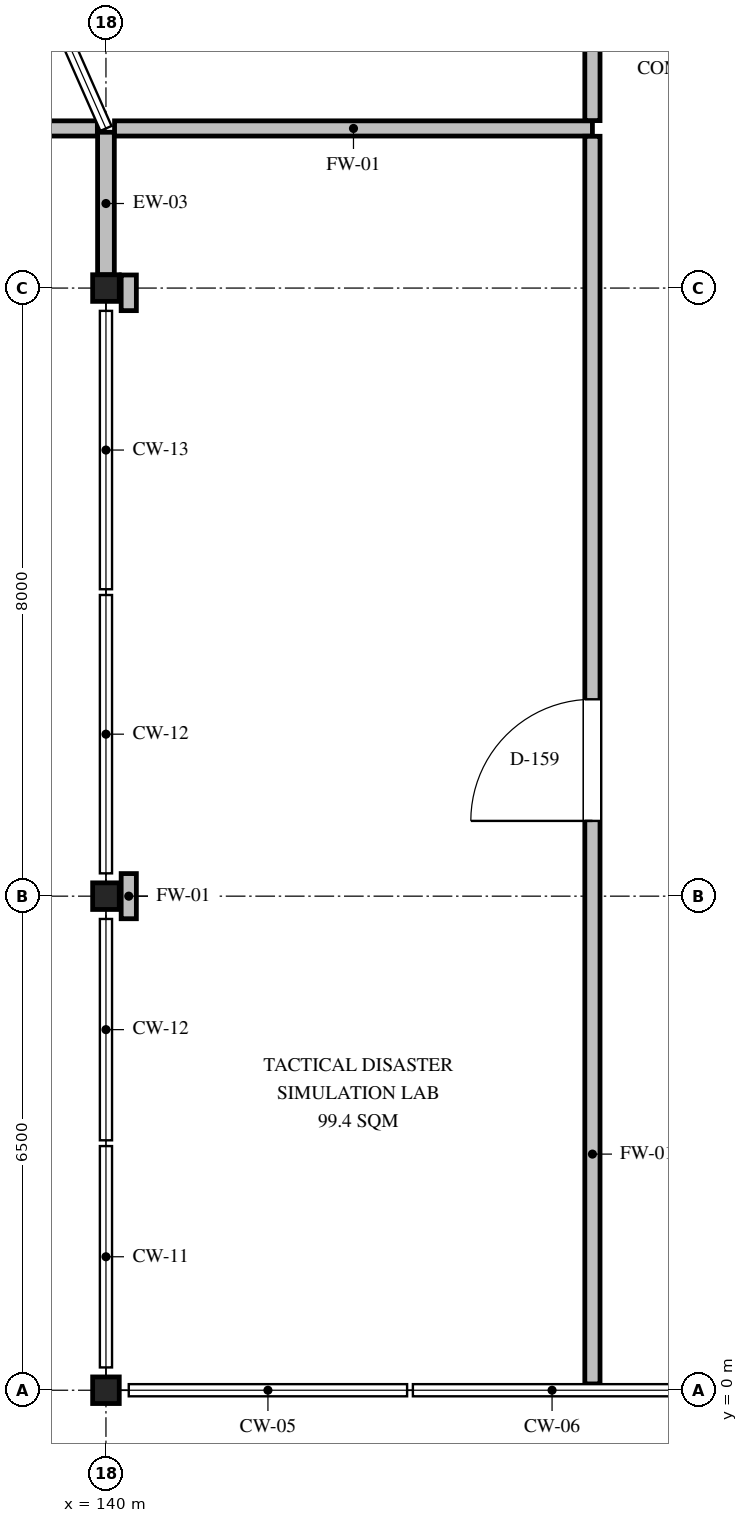
"""IFC4 building model, lengths in metres.
Left out: names, types, materials, properties, quantities, classifications, styles, units other than length and angle.
Written with IfcOpenShell. Run it as: python <this file> out.ifc"""

import sys

from ifc_helpers import new_model, si_unit, direction, frame, frame_2d, origin, origin_2d, place, context, subcontext, project, spatial, rectangle, i_section, extrude, element, fill, save


model = new_model("IFC4")
c1 = context("Model", 3, precision=1e-05, world=origin(), true_north=direction((0.0, 1.0)))
c2 = subcontext(c1, "Body", "Model", "MODEL_VIEW")
j1 = project(units=[si_unit("LENGTHUNIT", "METRE"), si_unit("PLANEANGLEUNIT", "RADIAN")], contexts=[c1])
p1 = place(None, origin())
s1 = spatial("IfcSite", under=j1, at=p1, CompositionType="ELEMENT")
p2 = place(p1, origin())
s2 = spatial("IfcBuilding", under=s1, at=p2, CompositionType="ELEMENT")
p3 = place(p2, frame((0.0, 0.0, 10.05)))
s3 = spatial("IfcBuildingStorey", under=s2, at=p3, CompositionType="ELEMENT", Elevation=10.05)
for number, where, z_axis, x_axis in (
    (1, (140.0, 0.0, 0.0), (0.0, 0.0, 1.0), (1.0, 0.0, 0.0)),
    (2, (140.0, 6.5, 0.0), (0.0, 0.0, 1.0), (1.0, 0.0, 0.0)),
    (3, (140.0, 14.5, 0.0), (0.0, 0.0, 1.0), (1.0, 0.0, 0.0)),
):
    element("IfcColumn", number, at=place(p3, frame(where, z_axis=z_axis, x_axis=x_axis)), inside=s3, PredefinedType="COLUMN", context=c2, shape_type="SweptSolid", body=[
        extrude(i_section(OverallWidth=0.35, OverallDepth=0.35, WebThickness=0.012, FlangeThickness=0.019, FilletRadius=0.02, at=origin_2d()), origin(), (0.0, 0.0, 1.0), 4.2),
    ])
p4 = place(p3, frame((140.0, 14.675, 0.0), z_axis=(0.0, 0.0, 1.0), x_axis=(0.0, 1.0, 0.0)))
e4 = element("IfcWall", 4, at=p4, inside=s3, PredefinedType="SOLIDWALL", context=c2, shape_type="SweptSolid", body=[
    extrude(rectangle(XDim=1.875, YDim=0.22, at=frame_2d((0.938, 0.0))), origin(), (0.0, 0.0, 1.0), 3.604),
])
p5 = place(p3, frame((140.113, 16.6, 0.0), z_axis=(0.0, 0.0, 1.0), x_axis=(1.0, 0.0, 0.0)))
e5 = element("IfcWall", 5, at=p5, inside=s3, PredefinedType="PARTITIONING", context=c2, shape_type="SweptSolid", body=[
    extrude(rectangle(XDim=6.287, YDim=0.2, at=frame_2d((3.144, 0.0))), origin(), (0.0, 0.0, 1.0), 4.0),
])
p6 = place(p3, frame((140.3, 6.203, 0.0), z_axis=(0.0, 0.0, 1.0), x_axis=(0.0, 1.0, 0.0)))
e6 = element("IfcWall", 6, at=p6, inside=s3, PredefinedType="PARTITIONING", context=c2, shape_type="SweptSolid", body=[
    extrude(rectangle(XDim=0.594, YDim=0.2, at=frame_2d((0.297, 0.0))), origin(), (0.0, 0.0, 1.0), 4.0),
])
p7 = place(p3, frame((140.3, 14.203, 0.0), z_axis=(0.0, 0.0, 1.0), x_axis=(0.0, 1.0, 0.0)))
e7 = element("IfcWall", 7, at=p7, inside=s3, PredefinedType="PARTITIONING", context=c2, shape_type="SweptSolid", body=[
    extrude(rectangle(XDim=0.469, YDim=0.2, at=frame_2d((0.235, 0.0))), origin(), (0.0, 0.0, 1.0), 4.0),
])
p8 = place(p3, frame((146.4, 0.083, 0.0), z_axis=(0.0, 0.0, 1.0), x_axis=(0.0, 1.0, 0.0)))
e8 = element("IfcWall", 8, at=p8, inside=s3, PredefinedType="PARTITIONING", context=c2, shape_type="SweptSolid", body=[
    extrude(rectangle(XDim=16.414, YDim=0.2, at=frame_2d((8.207, 0.0))), origin(), (0.0, 0.0, 1.0), 3.7),
])
p9 = place(p8, frame((7.407, 0.0, 0.0)))
e9 = element("IfcOpeningElement", 9, at=p9, cuts=e8, PredefinedType="OPENING", context=c2, shape_type="SweptSolid", body=[
    extrude(rectangle(XDim=1.6, YDim=2.2, at=frame_2d((0.8, 1.1))), frame((0.0, 0.11, 0.0), z_axis=(0.0, -1.0, 0.0), x_axis=(1.0, 0.0, 0.0)), (0.0, 0.0, 1.0), 0.22),
])
p10 = place(p3, frame((137.8, 16.6, 0.0), z_axis=(0.0, 0.0, 1.0), x_axis=(1.0, 0.0, 0.0)))
e10 = element("IfcWall", 10, at=p10, inside=s3, PredefinedType="PARTITIONING", context=c2, shape_type="SweptSolid", body=[
    extrude(rectangle(XDim=2.087, YDim=0.2, at=frame_2d((1.043, 0.0))), origin(), (0.0, 0.0, 1.0), 4.0),
])
p11 = place(p3, frame((146.4, 16.703, 0.0), z_axis=(0.0, 0.0, 1.0), x_axis=(0.0, 1.0, 0.0)))
e11 = element("IfcWall", 11, at=p11, inside=s3, PredefinedType="PARTITIONING", context=c2, shape_type="SweptSolid", body=[
    extrude(rectangle(XDim=16.394, YDim=0.2, at=frame_2d((8.197, 0.0))), origin(), (0.0, 0.0, 1.0), 3.644),
])
p12 = place(p11, frame((7.697, 0.0, 0.0)))
e12 = element("IfcOpeningElement", 12, at=p12, cuts=e11, PredefinedType="OPENING", context=c2, shape_type="SweptSolid", body=[
    extrude(rectangle(XDim=1.0, YDim=2.1, at=frame_2d((0.5, 1.05))), frame((0.0, 0.11, 0.0), z_axis=(0.0, -1.0, 0.0), x_axis=(1.0, 0.0, 0.0)), (0.0, 0.0, 1.0), 0.22),
])
p13 = place(p9, origin())
e13 = element("IfcDoor", 13, at=p13, inside=s3, OperationType="SINGLE_SWING_LEFT", PredefinedType="DOOR", context=c2, shape_type="SweptSolid", body=[
    extrude(rectangle(XDim=1.6, YDim=2.2, at=frame_2d((0.8, 1.1))), frame((0.0, 0.025, 0.0), z_axis=(0.0, -1.0, 0.0), x_axis=(1.0, 0.0, 0.0)), (0.0, 0.0, 1.0), 0.05),
])
fill(e9, e13)
save(model, sys.argv[1])
